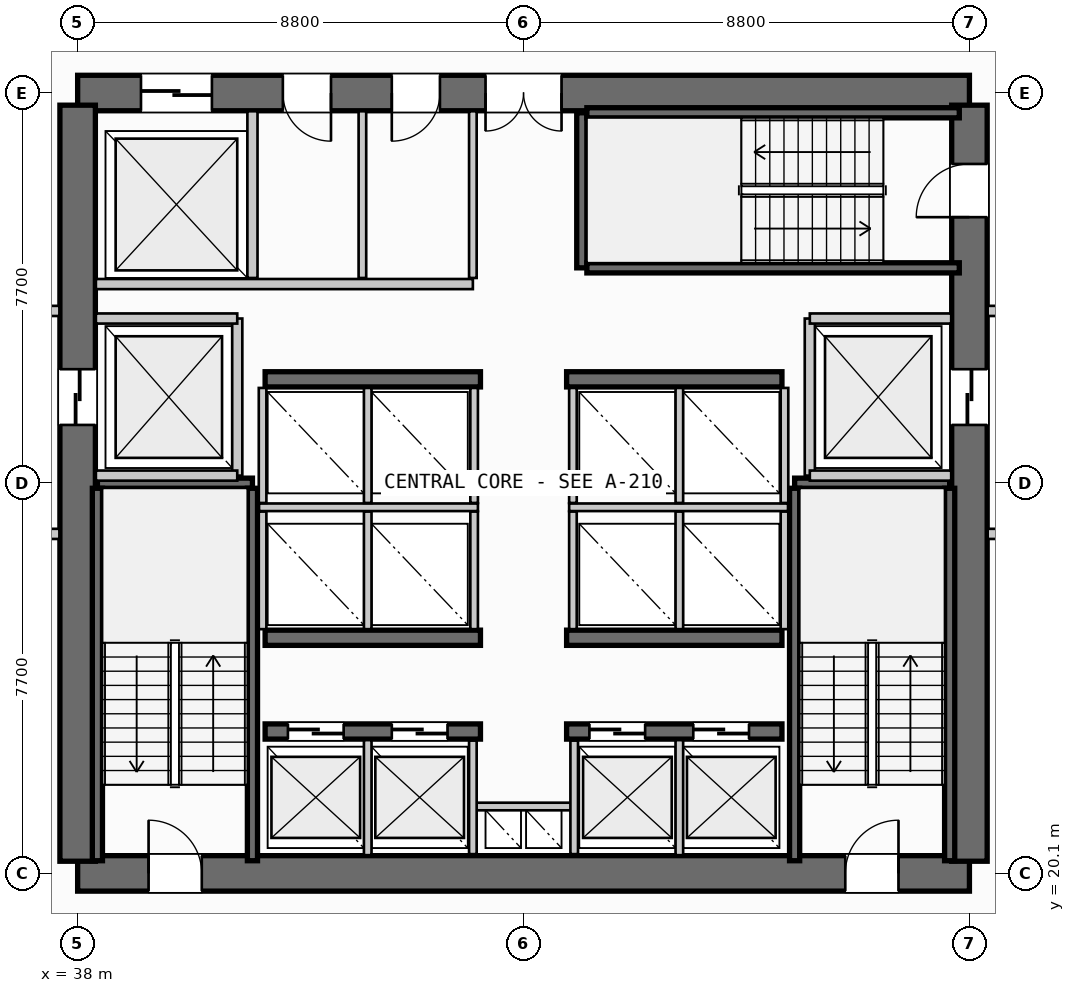
"""IFC4 building model, lengths in metres.
Left out: names, types, materials, properties, quantities, classifications, styles, units other than length and angle.
Written with IfcOpenShell. Run it as: python <this file> out.ifc"""

import sys

from ifc_helpers import new_model, si_unit, direction, frame, frame_2d, origin, place, context, subcontext, project, spatial, rectangle, extrude, source, transform, mapped, element, fill, save


model = new_model("IFC4")
c1 = context("Model", 3, precision=1e-05, world=origin(), true_north=direction((0.0, 1.0)))
c2 = subcontext(c1, "Body", "Model", "MODEL_VIEW")
j1 = project(units=[si_unit("LENGTHUNIT", "METRE"), si_unit("PLANEANGLEUNIT", "RADIAN")], contexts=[c1])
p1 = place(None, origin())
s1 = spatial("IfcSite", under=j1, at=p1, CompositionType="ELEMENT")
p2 = place(p1, origin())
s2 = spatial("IfcBuilding", under=s1, at=p2, CompositionType="ELEMENT")
p3 = place(p2, frame((0.0, 0.0, 67.6)))
s3 = spatial("IfcBuildingStorey", under=s2, at=p3, CompositionType="ELEMENT", Elevation=67.6)
p4 = place(p3, frame((38.0, 20.1, 0.0), z_axis=(0.0, 0.0, 1.0), x_axis=(1.0, 0.0, 0.0)))
e1 = element("IfcWall", 1, at=p4, inside=s3, PredefinedType="SHEAR", context=c2, shape_type="SweptSolid", body=[
    extrude(rectangle(XDim=17.6, YDim=0.7, at=frame_2d((8.8, 0.0))), origin(), (0.0, 0.0, 1.0), 3.55),
])
p5 = place(p4, frame((1.4, 0.0, 0.0)))
e2 = element("IfcOpeningElement", 2, at=p5, cuts=e1, PredefinedType="OPENING", context=c2, shape_type="SweptSolid", body=[
    extrude(rectangle(XDim=1.05, YDim=2.15, at=frame_2d((0.525, 1.075))), frame((0.0, 0.36, 0.0), z_axis=(0.0, -1.0, 0.0), x_axis=(1.0, 0.0, 0.0)), (0.0, 0.0, 1.0), 0.72),
])
p6 = place(p4, frame((15.15, 0.0, 0.0)))
e3 = element("IfcOpeningElement", 3, at=p6, cuts=e1, PredefinedType="OPENING", context=c2, shape_type="SweptSolid", body=[
    extrude(rectangle(XDim=1.05, YDim=2.15, at=frame_2d((0.525, 1.075))), frame((0.0, 0.36, 0.0), z_axis=(0.0, -1.0, 0.0), x_axis=(1.0, 0.0, 0.0)), (0.0, 0.0, 1.0), 0.72),
])
p7 = place(p3, frame((55.6, 35.5, 0.0), z_axis=(0.0, 0.0, 1.0), x_axis=(-1.0, 0.0, 0.0)))
e4 = element("IfcWall", 4, at=p7, inside=s3, PredefinedType="SHEAR", context=c2, shape_type="SweptSolid", body=[
    extrude(rectangle(XDim=17.6, YDim=0.7, at=frame_2d((8.8, 0.0))), origin(), (0.0, 0.0, 1.0), 3.55),
])
p8 = place(p7, frame((8.05, 0.0, 0.0)))
e5 = element("IfcOpeningElement", 5, at=p8, cuts=e4, PredefinedType="OPENING", context=c2, shape_type="SweptSolid", body=[
    extrude(rectangle(XDim=1.5, YDim=2.2, at=frame_2d((0.75, 1.1))), frame((0.0, 0.36, 0.0), z_axis=(0.0, -1.0, 0.0), x_axis=(1.0, 0.0, 0.0)), (0.0, 0.0, 1.0), 0.72),
])
p9 = place(p7, frame((14.95, 0.0, 0.0)))
e6 = element("IfcOpeningElement", 6, at=p9, cuts=e4, PredefinedType="OPENING", context=c2, shape_type="SweptSolid", body=[
    extrude(rectangle(XDim=1.4, YDim=2.3, at=frame_2d((0.7, 1.15))), frame((0.0, 0.36, 0.0), z_axis=(0.0, -1.0, 0.0), x_axis=(1.0, 0.0, 0.0)), (0.0, 0.0, 1.0), 0.72),
])
p10 = place(p7, frame((12.6, 0.0, 0.0)))
e7 = element("IfcOpeningElement", 7, at=p10, cuts=e4, PredefinedType="OPENING", context=c2, shape_type="SweptSolid", body=[
    extrude(rectangle(XDim=0.95, YDim=2.15, at=frame_2d((0.475, 1.075))), frame((0.0, 0.36, 0.0), z_axis=(0.0, -1.0, 0.0), x_axis=(1.0, 0.0, 0.0)), (0.0, 0.0, 1.0), 0.72),
])
p11 = place(p7, frame((10.45, 0.0, 0.0)))
e8 = element("IfcOpeningElement", 8, at=p11, cuts=e4, PredefinedType="OPENING", context=c2, shape_type="SweptSolid", body=[
    extrude(rectangle(XDim=0.95, YDim=2.15, at=frame_2d((0.475, 1.075))), frame((0.0, 0.36, 0.0), z_axis=(0.0, -1.0, 0.0), x_axis=(1.0, 0.0, 0.0)), (0.0, 0.0, 1.0), 0.72),
])
p12 = place(p3, frame((38.0, 35.26, 0.0), z_axis=(0.0, 0.0, 1.0), x_axis=(0.0, -1.0, 0.0)))
e9 = element("IfcWall", 9, at=p12, inside=s3, PredefinedType="SHEAR", context=c2, shape_type="SweptSolid", body=[
    extrude(rectangle(XDim=14.92, YDim=0.7, at=frame_2d((7.46, 0.0))), origin(), (0.0, 0.0, 1.0), 3.55),
])
p13 = place(p12, frame((5.21, 0.0, 0.0)))
e10 = element("IfcOpeningElement", 10, at=p13, cuts=e9, PredefinedType="OPENING", context=c2, shape_type="SweptSolid", body=[
    extrude(rectangle(XDim=1.1, YDim=2.2, at=frame_2d((0.55, 1.1))), frame((0.0, 0.36, 0.0), z_axis=(0.0, -1.0, 0.0), x_axis=(1.0, 0.0, 0.0)), (0.0, 0.0, 1.0), 0.72),
])
p14 = place(p3, frame((55.6, 20.34, 0.0), z_axis=(0.0, 0.0, 1.0), x_axis=(0.0, 1.0, 0.0)))
e11 = element("IfcWall", 11, at=p14, inside=s3, PredefinedType="SHEAR", context=c2, shape_type="SweptSolid", body=[
    extrude(rectangle(XDim=14.92, YDim=0.7, at=frame_2d((7.46, 0.0))), origin(), (0.0, 0.0, 1.0), 3.55),
])
p15 = place(p14, frame((12.71, 0.0, 0.0)))
e12 = element("IfcOpeningElement", 12, at=p15, cuts=e11, PredefinedType="OPENING", context=c2, shape_type="SweptSolid", body=[
    extrude(rectangle(XDim=1.05, YDim=2.15, at=frame_2d((0.525, 1.075))), frame((0.0, 0.36, 0.0), z_axis=(0.0, -1.0, 0.0), x_axis=(1.0, 0.0, 0.0)), (0.0, 0.0, 1.0), 0.72),
])
p16 = place(p14, frame((8.61, 0.0, 0.0)))
e13 = element("IfcOpeningElement", 13, at=p16, cuts=e11, PredefinedType="OPENING", context=c2, shape_type="SweptSolid", body=[
    extrude(rectangle(XDim=1.1, YDim=2.2, at=frame_2d((0.55, 1.1))), frame((0.0, 0.36, 0.0), z_axis=(0.0, -1.0, 0.0), x_axis=(1.0, 0.0, 0.0)), (0.0, 0.0, 1.0), 0.72),
])
p17 = place(p3, frame((41.7, 22.9, 0.0), z_axis=(0.0, 0.0, 1.0), x_axis=(1.0, 0.0, 0.0)))
e14 = element("IfcWall", 14, at=p17, inside=s3, PredefinedType="SHEAR", context=c2, shape_type="SweptSolid", body=[
    extrude(rectangle(XDim=4.25, YDim=0.3, at=frame_2d((2.125, 0.0))), origin(), (0.0, 0.0, 1.0), 3.55),
])
p18 = place(p17, frame((0.45, 0.0, 0.0)))
e15 = element("IfcOpeningElement", 15, at=p18, cuts=e14, PredefinedType="OPENING", context=c2, shape_type="SweptSolid", body=[
    extrude(rectangle(XDim=1.1, YDim=2.2, at=frame_2d((0.55, 1.1))), frame((0.0, 0.16, 0.0), z_axis=(0.0, -1.0, 0.0), x_axis=(1.0, 0.0, 0.0)), (0.0, 0.0, 1.0), 0.32),
])
p19 = place(p17, frame((2.5, 0.0, 0.0)))
e16 = element("IfcOpeningElement", 16, at=p19, cuts=e14, PredefinedType="OPENING", context=c2, shape_type="SweptSolid", body=[
    extrude(rectangle(XDim=1.1, YDim=2.2, at=frame_2d((0.55, 1.1))), frame((0.0, 0.16, 0.0), z_axis=(0.0, -1.0, 0.0), x_axis=(1.0, 0.0, 0.0)), (0.0, 0.0, 1.0), 0.32),
])
p20 = place(p3, frame((47.65, 22.9, 0.0), z_axis=(0.0, 0.0, 1.0), x_axis=(1.0, 0.0, 0.0)))
e17 = element("IfcWall", 17, at=p20, inside=s3, PredefinedType="SHEAR", context=c2, shape_type="SweptSolid", body=[
    extrude(rectangle(XDim=4.25, YDim=0.3, at=frame_2d((2.125, 0.0))), origin(), (0.0, 0.0, 1.0), 3.55),
])
p21 = place(p20, frame((0.45, 0.0, 0.0)))
e18 = element("IfcOpeningElement", 18, at=p21, cuts=e17, PredefinedType="OPENING", context=c2, shape_type="SweptSolid", body=[
    extrude(rectangle(XDim=1.1, YDim=2.2, at=frame_2d((0.55, 1.1))), frame((0.0, 0.16, 0.0), z_axis=(0.0, -1.0, 0.0), x_axis=(1.0, 0.0, 0.0)), (0.0, 0.0, 1.0), 0.32),
])
p22 = place(p20, frame((2.5, 0.0, 0.0)))
e19 = element("IfcOpeningElement", 19, at=p22, cuts=e17, PredefinedType="OPENING", context=c2, shape_type="SweptSolid", body=[
    extrude(rectangle(XDim=1.1, YDim=2.2, at=frame_2d((0.55, 1.1))), frame((0.0, 0.16, 0.0), z_axis=(0.0, -1.0, 0.0), x_axis=(1.0, 0.0, 0.0)), (0.0, 0.0, 1.0), 0.32),
])
for number, where, z_axis, x_axis in (
    (20, (41.7, 24.75, 0.0), (0.0, 0.0, 1.0), (1.0, 0.0, 0.0)),
    (21, (47.65, 24.75, 0.0), (0.0, 0.0, 1.0), (1.0, 0.0, 0.0)),
    (22, (41.7, 29.85, 0.0), (0.0, 0.0, 1.0), (1.0, 0.0, 0.0)),
    (23, (47.65, 29.85, 0.0), (0.0, 0.0, 1.0), (1.0, 0.0, 0.0)),
):
    element("IfcWall", number, at=place(p3, frame(where, z_axis=z_axis, x_axis=x_axis)), inside=s3, PredefinedType="SHEAR", context=c2, shape_type="SweptSolid", body=[
        extrude(rectangle(XDim=4.25, YDim=0.3, at=frame_2d((2.125, 0.0))), origin(), (0.0, 0.0, 1.0), 3.55),
    ])
p23 = place(p3, frame((38.39, 27.8, 0.0), z_axis=(0.0, 0.0, 1.0), x_axis=(1.0, 0.0, 0.0)))
e24 = element("IfcWall", 24, at=p23, inside=s3, PredefinedType="SHEAR", context=c2, shape_type="SweptSolid", body=[
    extrude(rectangle(XDim=3.06, YDim=0.2, at=frame_2d((1.53, 0.0))), origin(), (0.0, 0.0, 1.0), 3.55),
])
for number, where, z_axis, x_axis in (
    (25, (41.45, 27.7, 0.0), (0.0, 0.0, 1.0), (0.0, -1.0, 0.0)),
    (26, (38.39, 20.35, 0.0), (0.0, 0.0, 1.0), (0.0, 1.0, 0.0)),
):
    element("IfcWall", number, at=place(p3, frame(where, z_axis=z_axis, x_axis=x_axis)), inside=s3, PredefinedType="SHEAR", context=c2, shape_type="SweptSolid", body=[
        extrude(rectangle(XDim=7.35, YDim=0.2, at=frame_2d((3.675, 0.0))), origin(), (0.0, 0.0, 1.0), 3.55),
    ])
p24 = place(p3, frame((52.15, 27.8, 0.0), z_axis=(0.0, 0.0, 1.0), x_axis=(1.0, 0.0, 0.0)))
e27 = element("IfcWall", 27, at=p24, inside=s3, PredefinedType="SHEAR", context=c2, shape_type="SweptSolid", body=[
    extrude(rectangle(XDim=3.06, YDim=0.2, at=frame_2d((1.53, 0.0))), origin(), (0.0, 0.0, 1.0), 3.55),
])
for number, where, z_axis, x_axis in (
    (28, (55.21, 27.7, 0.0), (0.0, 0.0, 1.0), (0.0, -1.0, 0.0)),
    (29, (52.15, 20.35, 0.0), (0.0, 0.0, 1.0), (0.0, 1.0, 0.0)),
):
    element("IfcWall", number, at=place(p3, frame(where, z_axis=z_axis, x_axis=x_axis)), inside=s3, PredefinedType="SHEAR", context=c2, shape_type="SweptSolid", body=[
        extrude(rectangle(XDim=7.35, YDim=0.2, at=frame_2d((3.675, 0.0))), origin(), (0.0, 0.0, 1.0), 3.55),
    ])
p25 = place(p3, frame((47.95, 32.05, 0.0), z_axis=(0.0, 0.0, 1.0), x_axis=(0.0, 1.0, 0.0)))
e30 = element("IfcWall", 30, at=p25, inside=s3, PredefinedType="SHEAR", context=c2, shape_type="SweptSolid", body=[
    extrude(rectangle(XDim=3.06, YDim=0.2, at=frame_2d((1.53, 0.0))), origin(), (0.0, 0.0, 1.0), 3.55),
])
for number, where, z_axis, x_axis in (
    (31, (48.05, 35.11, 0.0), (0.0, 0.0, 1.0), (1.0, 0.0, 0.0)),
    (32, (55.4, 32.05, 0.0), (0.0, 0.0, 1.0), (-1.0, 0.0, 0.0)),
):
    element("IfcWall", number, at=place(p3, frame(where, z_axis=z_axis, x_axis=x_axis)), inside=s3, PredefinedType="SHEAR", context=c2, shape_type="SweptSolid", body=[
        extrude(rectangle(XDim=7.35, YDim=0.2, at=frame_2d((3.675, 0.0))), origin(), (0.0, 0.0, 1.0), 3.55),
    ])
p26 = place(p3, frame((45.8, 21.42, 0.0), z_axis=(0.0, 0.0, 1.0), x_axis=(1.0, 0.0, 0.0)))
e33 = element("IfcWall", 33, at=p26, inside=s3, PredefinedType="PARTITIONING", context=c2, shape_type="SweptSolid", body=[
    extrude(rectangle(XDim=2.0, YDim=0.15, at=frame_2d((1.0, 0.0))), origin(), (0.0, 0.0, 1.0), 2.505),
])
for number, where, z_axis, x_axis in (
    (34, (45.8, 20.48, 0.0), (0.0, 0.0, 1.0), (0.0, 1.0, 0.0)),
    (35, (47.8, 20.48, 0.0), (0.0, 0.0, 1.0), (0.0, 1.0, 0.0)),
):
    element("IfcWall", number, at=place(p3, frame(where, z_axis=z_axis, x_axis=x_axis)), inside=s3, PredefinedType="PARTITIONING", context=c2, shape_type="SweptSolid", body=[
        extrude(rectangle(XDim=2.24, YDim=0.15, at=frame_2d((1.12, 0.0))), origin(), (0.0, 0.0, 1.0), 2.505),
    ])
p27 = place(p3, frame((41.15, 27.95, 0.0), z_axis=(0.0, 0.0, 1.0), x_axis=(0.0, 1.0, 0.0)))
e36 = element("IfcWall", 36, at=p27, inside=s3, PredefinedType="PARTITIONING", context=c2, shape_type="SweptSolid", body=[
    extrude(rectangle(XDim=3.1, YDim=0.2, at=frame_2d((1.55, 0.0))), origin(), (0.0, 0.0, 1.0), 2.505),
])
for number, where, z_axis, x_axis in (
    (37, (38.36, 27.95, 0.0), (0.0, 0.0, 1.0), (1.0, 0.0, 0.0)),
    (38, (38.36, 31.05, 0.0), (0.0, 0.0, 1.0), (1.0, 0.0, 0.0)),
):
    element("IfcWall", number, at=place(p3, frame(where, z_axis=z_axis, x_axis=x_axis)), inside=s3, PredefinedType="PARTITIONING", context=c2, shape_type="SweptSolid", body=[
        extrude(rectangle(XDim=2.79, YDim=0.2, at=frame_2d((1.395, 0.0))), origin(), (0.0, 0.0, 1.0), 2.505),
    ])
for number, where, z_axis, x_axis in (
    (39, (34.5, 26.8, 0.0), (0.0, 0.0, 1.0), (1.0, 0.0, 0.0)),
    (40, (34.5, 31.2, 0.0), (0.0, 0.0, 1.0), (1.0, 0.0, 0.0)),
):
    element("IfcWall", number, at=place(p3, frame(where, z_axis=z_axis, x_axis=x_axis)), inside=s3, PredefinedType="PARTITIONING", context=c2, shape_type="SweptSolid", body=[
        extrude(rectangle(XDim=3.14, YDim=0.2, at=frame_2d((1.57, 0.0))), origin(), (0.0, 0.0, 1.0), 2.505),
    ])
p28 = place(p3, frame((52.45, 27.95, 0.0), z_axis=(0.0, 0.0, 1.0), x_axis=(0.0, 1.0, 0.0)))
e41 = element("IfcWall", 41, at=p28, inside=s3, PredefinedType="PARTITIONING", context=c2, shape_type="SweptSolid", body=[
    extrude(rectangle(XDim=3.1, YDim=0.2, at=frame_2d((1.55, 0.0))), origin(), (0.0, 0.0, 1.0), 2.505),
])
for number, where, z_axis, x_axis in (
    (42, (52.45, 27.95, 0.0), (0.0, 0.0, 1.0), (1.0, 0.0, 0.0)),
    (43, (52.45, 31.05, 0.0), (0.0, 0.0, 1.0), (1.0, 0.0, 0.0)),
):
    element("IfcWall", number, at=place(p3, frame(where, z_axis=z_axis, x_axis=x_axis)), inside=s3, PredefinedType="PARTITIONING", context=c2, shape_type="SweptSolid", body=[
        extrude(rectangle(XDim=2.79, YDim=0.2, at=frame_2d((1.395, 0.0))), origin(), (0.0, 0.0, 1.0), 2.505),
    ])
for number, where, z_axis, x_axis in (
    (44, (55.96, 26.8, 0.0), (0.0, 0.0, 1.0), (1.0, 0.0, 0.0)),
    (45, (55.96, 31.2, 0.0), (0.0, 0.0, 1.0), (1.0, 0.0, 0.0)),
):
    element("IfcWall", number, at=place(p3, frame(where, z_axis=z_axis, x_axis=x_axis)), inside=s3, PredefinedType="PARTITIONING", context=c2, shape_type="SweptSolid", body=[
        extrude(rectangle(XDim=3.14, YDim=0.2, at=frame_2d((1.57, 0.0))), origin(), (0.0, 0.0, 1.0), 2.505),
    ])
for number, where, z_axis, x_axis in (
    (46, (43.725, 20.46, 0.0), (0.0, 0.0, 1.0), (0.0, 1.0, 0.0)),
    (47, (49.875, 20.46, 0.0), (0.0, 0.0, 1.0), (0.0, 1.0, 0.0)),
):
    element("IfcWall", number, at=place(p3, frame(where, z_axis=z_axis, x_axis=x_axis)), inside=s3, PredefinedType="PARTITIONING", context=c2, shape_type="SweptSolid", body=[
        extrude(rectangle(XDim=2.27, YDim=0.15, at=frame_2d((1.135, 0.0))), origin(), (0.0, 0.0, 1.0), 2.505),
    ])
p29 = place(p3, frame((41.58, 27.325, 0.0), z_axis=(0.0, 0.0, 1.0), x_axis=(1.0, 0.0, 0.0)))
e48 = element("IfcWall", 48, at=p29, inside=s3, PredefinedType="PARTITIONING", context=c2, shape_type="SweptSolid", body=[
    extrude(rectangle(XDim=4.32, YDim=0.15, at=frame_2d((2.16, 0.0))), origin(), (0.0, 0.0, 1.0), 2.505),
])
p30 = place(p3, frame((47.7, 27.325, 0.0), z_axis=(0.0, 0.0, 1.0), x_axis=(1.0, 0.0, 0.0)))
e49 = element("IfcWall", 49, at=p30, inside=s3, PredefinedType="PARTITIONING", context=c2, shape_type="SweptSolid", body=[
    extrude(rectangle(XDim=4.32, YDim=0.15, at=frame_2d((2.16, 0.0))), origin(), (0.0, 0.0, 1.0), 2.505),
])
for number, where, z_axis, x_axis in (
    (50, (41.65, 24.92, 0.0), (0.0, 0.0, 1.0), (0.0, 1.0, 0.0)),
    (51, (43.725, 24.92, 0.0), (0.0, 0.0, 1.0), (0.0, 1.0, 0.0)),
    (52, (45.825, 24.92, 0.0), (0.0, 0.0, 1.0), (0.0, 1.0, 0.0)),
    (53, (47.775, 24.92, 0.0), (0.0, 0.0, 1.0), (0.0, 1.0, 0.0)),
    (54, (49.875, 24.92, 0.0), (0.0, 0.0, 1.0), (0.0, 1.0, 0.0)),
    (55, (51.95, 24.92, 0.0), (0.0, 0.0, 1.0), (0.0, 1.0, 0.0)),
):
    element("IfcWall", number, at=place(p3, frame(where, z_axis=z_axis, x_axis=x_axis)), inside=s3, PredefinedType="PARTITIONING", context=c2, shape_type="SweptSolid", body=[
        extrude(rectangle(XDim=2.32, YDim=0.15, at=frame_2d((1.16, 0.0))), origin(), (0.0, 0.0, 1.0), 2.505),
    ])
for number, where, z_axis, x_axis in (
    (56, (41.65, 27.41, 0.0), (0.0, 0.0, 1.0), (0.0, 1.0, 0.0)),
    (57, (43.725, 27.41, 0.0), (0.0, 0.0, 1.0), (0.0, 1.0, 0.0)),
    (58, (45.825, 27.41, 0.0), (0.0, 0.0, 1.0), (0.0, 1.0, 0.0)),
    (59, (47.775, 27.41, 0.0), (0.0, 0.0, 1.0), (0.0, 1.0, 0.0)),
    (60, (49.875, 27.41, 0.0), (0.0, 0.0, 1.0), (0.0, 1.0, 0.0)),
    (61, (51.95, 27.41, 0.0), (0.0, 0.0, 1.0), (0.0, 1.0, 0.0)),
):
    element("IfcWall", number, at=place(p3, frame(where, z_axis=z_axis, x_axis=x_axis)), inside=s3, PredefinedType="PARTITIONING", context=c2, shape_type="SweptSolid", body=[
        extrude(rectangle(XDim=2.27, YDim=0.15, at=frame_2d((1.135, 0.0))), origin(), (0.0, 0.0, 1.0), 2.505),
    ])
p31 = place(p3, frame((41.45, 31.85, 0.0), z_axis=(0.0, 0.0, 1.0), x_axis=(0.0, 1.0, 0.0)))
e62 = element("IfcWall", 62, at=p31, inside=s3, PredefinedType="PARTITIONING", context=c2, shape_type="SweptSolid", body=[
    extrude(rectangle(XDim=3.29, YDim=0.2, at=frame_2d((1.645, 0.0))), origin(), (0.0, 0.0, 1.0), 2.505),
])
p32 = place(p3, frame((38.36, 31.73, 0.0), z_axis=(0.0, 0.0, 1.0), x_axis=(1.0, 0.0, 0.0)))
e63 = element("IfcWall", 63, at=p32, inside=s3, PredefinedType="PARTITIONING", context=c2, shape_type="SweptSolid", body=[
    extrude(rectangle(XDim=7.44, YDim=0.2, at=frame_2d((3.72, 0.0))), origin(), (0.0, 0.0, 1.0), 2.505),
])
p33 = place(p3, frame((45.8, 31.85, 0.0), z_axis=(0.0, 0.0, 1.0), x_axis=(0.0, 1.0, 0.0)))
e64 = element("IfcWall", 64, at=p33, inside=s3, PredefinedType="PARTITIONING", context=c2, shape_type="SweptSolid", body=[
    extrude(rectangle(XDim=3.29, YDim=0.15, at=frame_2d((1.645, 0.0))), origin(), (0.0, 0.0, 1.0), 2.505),
])
p34 = place(p3, frame((43.62, 31.85, 0.0), z_axis=(0.0, 0.0, 1.0), x_axis=(0.0, 1.0, 0.0)))
e65 = element("IfcWall", 65, at=p34, inside=s3, PredefinedType="PLUMBINGWALL", context=c2, shape_type="SweptSolid", body=[
    extrude(rectangle(XDim=3.29, YDim=0.15, at=frame_2d((1.645, 0.0))), origin(), (0.0, 0.0, 1.0), 2.505),
])
m1 = source(origin(), c2, "Body", "SweptSolid", [
    extrude(rectangle(XDim=1.05, YDim=2.15, at=frame_2d((0.525, 1.075))), frame((0.0, 0.025, 0.0), z_axis=(0.0, -1.0, 0.0), x_axis=(1.0, 0.0, 0.0)), (0.0, 0.0, 1.0), 0.05),
])
p35 = place(p5, origin())
e66 = element("IfcDoor", 66, at=p35, inside=s3, OperationType="SINGLE_SWING_LEFT", PredefinedType="DOOR", context=c2, shape_type="MappedRepresentation", body=[
    mapped(m1, transform((0.0, 0.0, 0.0), scale=1.0)),
])
fill(e2, e66)
p36 = place(p6, origin())
e67 = element("IfcDoor", 67, at=p36, inside=s3, OperationType="SINGLE_SWING_RIGHT", PredefinedType="DOOR", context=c2, shape_type="MappedRepresentation", body=[
    mapped(m1, transform((0.0, 0.0, 0.0), scale=1.0)),
])
fill(e3, e67)
p37 = place(p15, origin())
e68 = element("IfcDoor", 68, at=p37, inside=s3, OperationType="SINGLE_SWING_LEFT", PredefinedType="DOOR", context=c2, shape_type="MappedRepresentation", body=[
    mapped(m1, transform((0.0, 0.0, 0.0), scale=1.0)),
])
fill(e12, e68)
m2 = source(origin(), c2, "Body", "SweptSolid", [
    extrude(rectangle(XDim=1.5, YDim=2.2, at=frame_2d((0.75, 1.1))), frame((0.0, 0.025, 0.0), z_axis=(0.0, -1.0, 0.0), x_axis=(1.0, 0.0, 0.0)), (0.0, 0.0, 1.0), 0.05),
])
p38 = place(p8, origin())
e69 = element("IfcDoor", 69, at=p38, inside=s3, OperationType="DOUBLE_DOOR_SINGLE_SWING", PredefinedType="DOOR", context=c2, shape_type="MappedRepresentation", body=[
    mapped(m2, transform((0.0, 0.0, 0.0), scale=1.0)),
])
fill(e5, e69)
m3 = source(origin(), c2, "Body", "SweptSolid", [
    extrude(rectangle(XDim=1.1, YDim=2.2, at=frame_2d((0.55, 1.1))), frame((0.0, 0.025, 0.0), z_axis=(0.0, -1.0, 0.0), x_axis=(1.0, 0.0, 0.0)), (0.0, 0.0, 1.0), 0.05),
])
p39 = place(p13, origin())
e70 = element("IfcDoor", 70, at=p39, inside=s3, OperationType="SLIDING_TO_LEFT", PredefinedType="DOOR", context=c2, shape_type="MappedRepresentation", body=[
    mapped(m3, transform((0.0, 0.0, 0.0), scale=1.0)),
])
fill(e10, e70)
p40 = place(p16, origin())
e71 = element("IfcDoor", 71, at=p40, inside=s3, OperationType="SLIDING_TO_RIGHT", PredefinedType="DOOR", context=c2, shape_type="MappedRepresentation", body=[
    mapped(m3, transform((0.0, 0.0, 0.0), scale=1.0)),
])
fill(e13, e71)
p41 = place(p18, origin())
e72 = element("IfcDoor", 72, at=p41, inside=s3, OperationType="SLIDING_TO_LEFT", PredefinedType="DOOR", context=c2, shape_type="MappedRepresentation", body=[
    mapped(m3, transform((0.0, 0.0, 0.0), scale=1.0)),
])
fill(e15, e72)
p42 = place(p19, origin())
e73 = element("IfcDoor", 73, at=p42, inside=s3, OperationType="SLIDING_TO_LEFT", PredefinedType="DOOR", context=c2, shape_type="MappedRepresentation", body=[
    mapped(m3, transform((0.0, 0.0, 0.0), scale=1.0)),
])
fill(e16, e73)
p43 = place(p21, origin())
e74 = element("IfcDoor", 74, at=p43, inside=s3, OperationType="SLIDING_TO_LEFT", PredefinedType="DOOR", context=c2, shape_type="MappedRepresentation", body=[
    mapped(m3, transform((0.0, 0.0, 0.0), scale=1.0)),
])
fill(e18, e74)
p44 = place(p22, origin())
e75 = element("IfcDoor", 75, at=p44, inside=s3, OperationType="SLIDING_TO_LEFT", PredefinedType="DOOR", context=c2, shape_type="MappedRepresentation", body=[
    mapped(m3, transform((0.0, 0.0, 0.0), scale=1.0)),
])
fill(e19, e75)
m4 = source(origin(), c2, "Body", "SweptSolid", [
    extrude(rectangle(XDim=1.4, YDim=2.3, at=frame_2d((0.7, 1.15))), frame((0.0, 0.025, 0.0), z_axis=(0.0, -1.0, 0.0), x_axis=(1.0, 0.0, 0.0)), (0.0, 0.0, 1.0), 0.05),
])
p45 = place(p9, origin())
e76 = element("IfcDoor", 76, at=p45, inside=s3, OperationType="SLIDING_TO_RIGHT", PredefinedType="DOOR", context=c2, shape_type="MappedRepresentation", body=[
    mapped(m4, transform((0.0, 0.0, 0.0), scale=1.0)),
])
fill(e6, e76)
m5 = source(origin(), c2, "Body", "SweptSolid", [
    extrude(rectangle(XDim=0.95, YDim=2.15, at=frame_2d((0.475, 1.075))), frame((0.0, 0.025, 0.0), z_axis=(0.0, -1.0, 0.0), x_axis=(1.0, 0.0, 0.0)), (0.0, 0.0, 1.0), 0.05),
])
p46 = place(p10, origin())
e77 = element("IfcDoor", 77, at=p46, inside=s3, OperationType="SINGLE_SWING_LEFT", PredefinedType="DOOR", context=c2, shape_type="MappedRepresentation", body=[
    mapped(m5, transform((0.0, 0.0, 0.0), scale=1.0)),
])
fill(e7, e77)
p47 = place(p11, origin())
e78 = element("IfcDoor", 78, at=p47, inside=s3, OperationType="SINGLE_SWING_RIGHT", PredefinedType="DOOR", context=c2, shape_type="MappedRepresentation", body=[
    mapped(m5, transform((0.0, 0.0, 0.0), scale=1.0)),
])
fill(e8, e78)
save(model, sys.argv[1])
